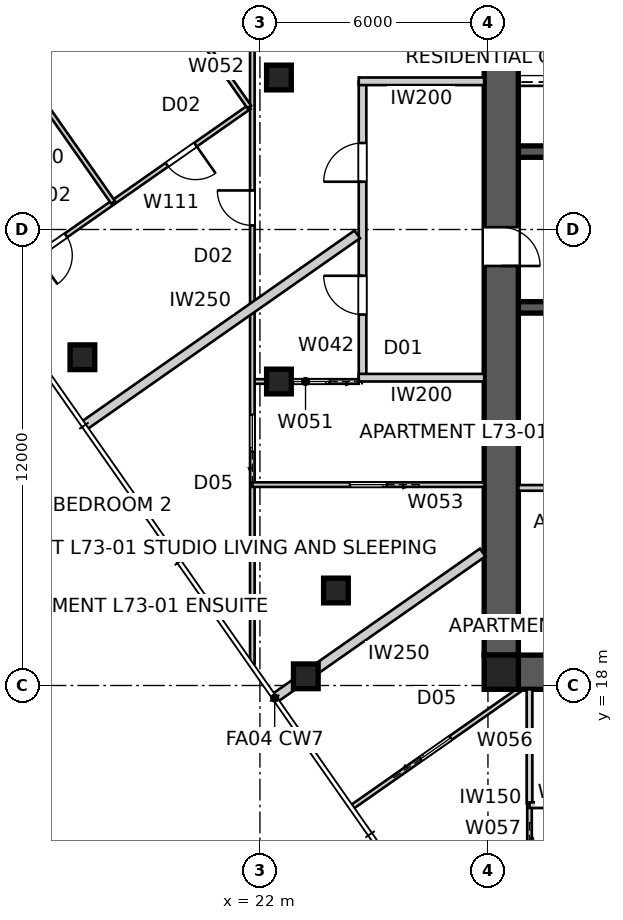
"""IFC4 building model, lengths in metres.
Left out: names, types, materials, properties, quantities, classifications, styles, units other than length and angle.
Written with IfcOpenShell. Run it as: python <this file> out.ifc"""

import sys

from ifc_helpers import new_model, si_unit, direction, frame, frame_2d, origin, origin_2d, place, context, subcontext, project, spatial, polyline, rectangle, outline, extrude, element, fill, save


model = new_model("IFC4")
c1 = context("Model", 3, precision=1e-05, world=origin(), true_north=direction((0.0, 1.0)))
c2 = subcontext(c1, "Body", "Model", "MODEL_VIEW")
j1 = project(units=[si_unit("LENGTHUNIT", "METRE"), si_unit("PLANEANGLEUNIT", "RADIAN")], contexts=[c1])
p1 = place(None, origin())
s1 = spatial("IfcSite", under=j1, at=p1, CompositionType="ELEMENT")
p2 = place(p1, origin())
s2 = spatial("IfcBuilding", under=s1, at=p2, CompositionType="ELEMENT")
p3 = place(p2, frame((0.0, 0.0, 264.2)))
s3 = spatial("IfcBuildingStorey", under=s2, at=p3, CompositionType="ELEMENT", Elevation=264.2)
p4 = place(p3, frame((51.2, 18.35, 0.0), z_axis=(0.0, 0.0, 1.0), x_axis=(-1.0, 0.0, 0.0)))
e1 = element("IfcWall", 1, at=p4, inside=s3, PredefinedType="SHEAR", context=c2, shape_type="SweptSolid", body=[
    extrude(outline(polyline([(0.0, -0.45), (22.4, -0.45), (22.4, -0.025), (22.85, -0.025), (22.85, 0.025), (22.4, 0.025), (22.4, 0.45), (0.0, 0.45), (0.0, 0.025), (-0.45, 0.025), (-0.45, -0.025), (0.0, -0.025), (0.0, -0.45)])), origin(), (0.0, 0.0, 1.0), 3.4),
])
p5 = place(p3, frame((28.35, 41.2, 0.0), z_axis=(0.0, 0.0, 1.0), x_axis=(0.0, -1.0, 0.0)))
e2 = element("IfcWall", 2, at=p5, inside=s3, PredefinedType="SHEAR", context=c2, shape_type="SweptSolid", body=[
    extrude(outline(polyline([(0.0, -0.45), (22.4, -0.45), (22.4, -0.025), (22.85, -0.025), (22.85, 0.025), (22.4, 0.025), (22.4, 0.45), (0.0, 0.45), (0.0, 0.025), (-0.45, 0.025), (-0.45, -0.025), (0.0, -0.025), (0.0, -0.45)])), origin(), (0.0, 0.0, 1.0), 3.4),
])
p6 = place(p5, frame((11.14, 0.0, 0.0)))
e3 = element("IfcOpeningElement", 3, at=p6, cuts=e2, PredefinedType="OPENING", context=c2, shape_type="SweptSolid", body=[
    extrude(rectangle(XDim=1.02, YDim=2.4, at=frame_2d((0.51, 1.2))), frame((0.0, 0.46, 0.0), z_axis=(0.0, -1.0, 0.0), x_axis=(1.0, 0.0, 0.0)), (0.0, 0.0, 1.0), 0.92),
])
p7 = place(p3, frame((28.8, 32.05, 0.0), z_axis=(0.0, 0.0, 1.0), x_axis=(1.0, 0.0, 0.0)))
e4 = element("IfcWall", 4, at=p7, inside=s3, PredefinedType="SHEAR", context=c2, shape_type="SweptSolid", body=[
    extrude(rectangle(XDim=22.4, YDim=0.3, at=frame_2d((11.2, 0.0))), origin(), (0.0, 0.0, 1.0), 3.4),
])
p8 = place(p7, frame((19.04, 0.0, 0.0)))
e5 = element("IfcOpeningElement", 5, at=p8, cuts=e4, PredefinedType="OPENING", context=c2, shape_type="SweptSolid", body=[
    extrude(rectangle(XDim=0.92, YDim=2.1, at=frame_2d((0.46, 1.05))), frame((0.0, 0.16, 0.0), z_axis=(0.0, -1.0, 0.0), x_axis=(1.0, 0.0, 0.0)), (0.0, 0.0, 1.0), 0.32),
])
p9 = place(p7, frame((1.265, 0.0, 0.0)))
e6 = element("IfcOpeningElement", 6, at=p9, cuts=e4, PredefinedType="OPENING", context=c2, shape_type="SweptSolid", body=[
    extrude(rectangle(XDim=1.02, YDim=2.1, at=frame_2d((0.51, 1.05))), frame((0.0, 0.16, 0.0), z_axis=(0.0, -1.0, 0.0), x_axis=(1.0, 0.0, 0.0)), (0.0, 0.0, 1.0), 0.32),
])
p10 = place(p7, frame((4.015, 0.0, 0.0)))
e7 = element("IfcOpeningElement", 7, at=p10, cuts=e4, PredefinedType="OPENING", context=c2, shape_type="SweptSolid", body=[
    extrude(rectangle(XDim=0.92, YDim=2.1, at=frame_2d((0.46, 1.05))), frame((0.0, 0.16, 0.0), z_axis=(0.0, -1.0, 0.0), x_axis=(1.0, 0.0, 0.0)), (0.0, 0.0, 1.0), 0.32),
])
p11 = place(p7, frame((6.115, 0.0, 0.0)))
e8 = element("IfcOpeningElement", 8, at=p11, cuts=e4, PredefinedType="OPENING", context=c2, shape_type="SweptSolid", body=[
    extrude(rectangle(XDim=0.92, YDim=2.1, at=frame_2d((0.46, 1.05))), frame((0.0, 0.16, 0.0), z_axis=(0.0, -1.0, 0.0), x_axis=(1.0, 0.0, 0.0)), (0.0, 0.0, 1.0), 0.32),
])
p12 = place(p7, frame((9.79, 0.0, 0.0)))
e9 = element("IfcOpeningElement", 9, at=p12, cuts=e4, PredefinedType="OPENING", context=c2, shape_type="SweptSolid", body=[
    extrude(rectangle(XDim=0.92, YDim=2.1, at=frame_2d((0.46, 1.05))), frame((0.0, 0.16, 0.0), z_axis=(0.0, -1.0, 0.0), x_axis=(1.0, 0.0, 0.0)), (0.0, 0.0, 1.0), 0.32),
])
p13 = place(p7, frame((12.05, 0.0, 0.0)))
e10 = element("IfcOpeningElement", 10, at=p13, cuts=e4, PredefinedType="OPENING", context=c2, shape_type="SweptSolid", body=[
    extrude(rectangle(XDim=1.1, YDim=2.1, at=frame_2d((0.55, 1.05))), frame((0.0, 0.16, 0.0), z_axis=(0.0, -1.0, 0.0), x_axis=(1.0, 0.0, 0.0)), (0.0, 0.0, 1.0), 0.32),
])
p14 = place(p7, frame((14.85, 0.0, 0.0)))
e11 = element("IfcOpeningElement", 11, at=p14, cuts=e4, PredefinedType="OPENING", context=c2, shape_type="SweptSolid", body=[
    extrude(rectangle(XDim=1.1, YDim=2.1, at=frame_2d((0.55, 1.05))), frame((0.0, 0.16, 0.0), z_axis=(0.0, -1.0, 0.0), x_axis=(1.0, 0.0, 0.0)), (0.0, 0.0, 1.0), 0.32),
])
p15 = place(p3, frame((51.2, 27.95, 0.0), z_axis=(0.0, 0.0, 1.0), x_axis=(-1.0, 0.0, 0.0)))
e12 = element("IfcWall", 12, at=p15, inside=s3, PredefinedType="SHEAR", context=c2, shape_type="SweptSolid", body=[
    extrude(rectangle(XDim=22.4, YDim=0.3, at=frame_2d((11.2, 0.0))), origin(), (0.0, 0.0, 1.0), 3.4),
])
p16 = place(p15, frame((19.04, 0.0, 0.0)))
e13 = element("IfcOpeningElement", 13, at=p16, cuts=e12, PredefinedType="OPENING", context=c2, shape_type="SweptSolid", body=[
    extrude(rectangle(XDim=0.92, YDim=2.1, at=frame_2d((0.46, 1.05))), frame((0.0, 0.16, 0.0), z_axis=(0.0, -1.0, 0.0), x_axis=(1.0, 0.0, 0.0)), (0.0, 0.0, 1.0), 0.32),
])
p17 = place(p15, frame((1.265, 0.0, 0.0)))
e14 = element("IfcOpeningElement", 14, at=p17, cuts=e12, PredefinedType="OPENING", context=c2, shape_type="SweptSolid", body=[
    extrude(rectangle(XDim=1.02, YDim=2.1, at=frame_2d((0.51, 1.05))), frame((0.0, 0.16, 0.0), z_axis=(0.0, -1.0, 0.0), x_axis=(1.0, 0.0, 0.0)), (0.0, 0.0, 1.0), 0.32),
])
p18 = place(p15, frame((4.015, 0.0, 0.0)))
e15 = element("IfcOpeningElement", 15, at=p18, cuts=e12, PredefinedType="OPENING", context=c2, shape_type="SweptSolid", body=[
    extrude(rectangle(XDim=0.92, YDim=2.1, at=frame_2d((0.46, 1.05))), frame((0.0, 0.16, 0.0), z_axis=(0.0, -1.0, 0.0), x_axis=(1.0, 0.0, 0.0)), (0.0, 0.0, 1.0), 0.32),
])
p19 = place(p15, frame((9.34, 0.0, 0.0)))
e16 = element("IfcOpeningElement", 16, at=p19, cuts=e12, PredefinedType="OPENING", context=c2, shape_type="SweptSolid", body=[
    extrude(rectangle(XDim=0.92, YDim=2.1, at=frame_2d((0.46, 1.05))), frame((0.0, 0.16, 0.0), z_axis=(0.0, -1.0, 0.0), x_axis=(1.0, 0.0, 0.0)), (0.0, 0.0, 1.0), 0.32),
])
p20 = place(p15, frame((7.015, 0.0, 0.0)))
e17 = element("IfcOpeningElement", 17, at=p20, cuts=e12, PredefinedType="OPENING", context=c2, shape_type="SweptSolid", body=[
    extrude(rectangle(XDim=0.92, YDim=2.1, at=frame_2d((0.46, 1.05))), frame((0.0, 0.16, 0.0), z_axis=(0.0, -1.0, 0.0), x_axis=(1.0, 0.0, 0.0)), (0.0, 0.0, 1.0), 0.32),
])
p21 = place(p15, frame((12.05, 0.0, 0.0)))
e18 = element("IfcOpeningElement", 18, at=p21, cuts=e12, PredefinedType="OPENING", context=c2, shape_type="SweptSolid", body=[
    extrude(rectangle(XDim=1.1, YDim=2.1, at=frame_2d((0.55, 1.05))), frame((0.0, 0.16, 0.0), z_axis=(0.0, -1.0, 0.0), x_axis=(1.0, 0.0, 0.0)), (0.0, 0.0, 1.0), 0.32),
])
p22 = place(p15, frame((14.85, 0.0, 0.0)))
e19 = element("IfcOpeningElement", 19, at=p22, cuts=e12, PredefinedType="OPENING", context=c2, shape_type="SweptSolid", body=[
    extrude(rectangle(XDim=1.1, YDim=2.1, at=frame_2d((0.55, 1.05))), frame((0.0, 0.16, 0.0), z_axis=(0.0, -1.0, 0.0), x_axis=(1.0, 0.0, 0.0)), (0.0, 0.0, 1.0), 0.32),
])
p23 = place(p3, frame((28.35, 18.35, 0.0), z_axis=(0.0, 0.0, 1.0), x_axis=(1.0, 0.0, 0.0)))
e20 = element("IfcColumn", 20, at=p23, inside=s3, PredefinedType="COLUMN", context=c2, shape_type="SweptSolid", body=[
    extrude(rectangle(XDim=0.9, YDim=0.9, at=origin_2d()), origin(), (0.0, 0.0, 1.0), 3.4),
])
for number, where, z_axis, x_axis in (
    (21, (17.328, 26.638, 0.0), (0.0, 0.0, 1.0), (1.0, 0.0, 0.0)),
    (22, (23.207, 18.242, 0.0), (0.0, 0.0, 1.0), (1.0, 0.0, 0.0)),
):
    element("IfcColumn", number, at=place(p3, frame(where, z_axis=z_axis, x_axis=x_axis)), inside=s3, PredefinedType="COLUMN", context=c2, shape_type="SweptSolid", body=[
        extrude(rectangle(XDim=0.65, YDim=0.65, at=origin_2d()), origin(), (0.0, 0.0, 1.0), 3.2),
    ])
for number, where, z_axis, x_axis in (
    (23, (22.5, 34.0, 0.0), (0.0, 0.0, 1.0), (1.0, 0.0, 0.0)),
    (24, (22.5, 26.0, 0.0), (0.0, 0.0, 1.0), (1.0, 0.0, 0.0)),
    (25, (24.0, 20.5, 0.0), (0.0, 0.0, 1.0), (1.0, 0.0, 0.0)),
):
    element("IfcColumn", number, at=place(p3, frame(where, z_axis=z_axis, x_axis=x_axis)), inside=s3, PredefinedType="COLUMN", context=c2, shape_type="SweptSolid", body=[
        extrude(rectangle(XDim=0.65, YDim=0.65, at=origin_2d()), origin(), (0.0, 0.0, 1.0), 3.4),
    ])
p24 = place(p3, frame((24.7, 26.1, 0.0), z_axis=(0.0, 0.0, 1.0), x_axis=(0.0, 1.0, 0.0)))
e26 = element("IfcWall", 26, at=p24, inside=s3, PredefinedType="PARTITIONING", context=c2, shape_type="SweptSolid", body=[
    extrude(rectangle(XDim=7.8, YDim=0.2, at=frame_2d((3.9, 0.0))), origin(), (0.0, 0.0, 1.0), 3.2),
])
p25 = place(p24, frame((1.662, 0.0, 0.0)))
e27 = element("IfcOpeningElement", 27, at=p25, cuts=e26, PredefinedType="OPENING", context=c2, shape_type="SweptSolid", body=[
    extrude(rectangle(XDim=1.02, YDim=2.34, at=frame_2d((0.51, 1.17))), frame((0.0, 0.11, 0.0), z_axis=(0.0, -1.0, 0.0), x_axis=(1.0, 0.0, 0.0)), (0.0, 0.0, 1.0), 0.22),
])
p26 = place(p24, frame((5.157, 0.0, 0.0)))
e28 = element("IfcOpeningElement", 28, at=p26, cuts=e26, PredefinedType="OPENING", context=c2, shape_type="SweptSolid", body=[
    extrude(rectangle(XDim=1.02, YDim=2.34, at=frame_2d((0.51, 1.17))), frame((0.0, 0.11, 0.0), z_axis=(0.0, -1.0, 0.0), x_axis=(1.0, 0.0, 0.0)), (0.0, 0.0, 1.0), 0.22),
])
for number, where, z_axis, x_axis in (
    (29, (27.9, 33.9, 0.0), (0.0, 0.0, 1.0), (-1.0, 0.0, 0.0)),
    (30, (27.9, 26.1, 0.0), (0.0, 0.0, 1.0), (-1.0, 0.0, 0.0)),
):
    element("IfcWall", number, at=place(p3, frame(where, z_axis=z_axis, x_axis=x_axis)), inside=s3, PredefinedType="PARTITIONING", context=c2, shape_type="SweptSolid", body=[
        extrude(rectangle(XDim=3.3, YDim=0.2, at=frame_2d((1.65, 0.0))), origin(), (0.0, 0.0, 1.0), 3.2),
    ])
p27 = place(p3, frame((22.388, 17.668, 0.0), z_axis=(0.0, 0.0, 1.0), x_axis=(0.819161528122, 0.573562891796, 0.0)))
e31 = element("IfcWall", 31, at=p27, inside=s3, PredefinedType="PARTITIONING", context=c2, shape_type="SweptSolid", body=[
    extrude(rectangle(XDim=6.681, YDim=0.25, at=frame_2d((3.341, 0.0))), origin(), (0.0, 0.0, 1.0), 3.2),
])
p28 = place(p3, frame((17.369, 24.836, 0.0), z_axis=(0.0, 0.0, 1.0), x_axis=(0.819152220062, 0.573576185321, 0.0)))
e32 = element("IfcWall", 32, at=p28, inside=s3, PredefinedType="PARTITIONING", context=c2, shape_type="SweptSolid", body=[
    extrude(rectangle(XDim=8.779, YDim=0.25, at=frame_2d((4.39, 0.0))), origin(), (0.0, 0.0, 1.0), 3.2),
])
p29 = place(p3, frame((37.0, 23.2, 0.0), z_axis=(0.0, 0.0, 1.0), x_axis=(-1.0, 0.0, 0.0)))
e33 = element("IfcWall", 33, at=p29, inside=s3, PredefinedType="SOLIDWALL", context=c2, shape_type="SweptSolid", body=[
    extrude(rectangle(XDim=8.2, YDim=0.15, at=frame_2d((4.1, 0.0))), origin(), (0.0, 0.0, 1.0), 3.2),
])
p30 = place(p29, frame((3.64, 0.0, 0.0)))
e34 = element("IfcOpeningElement", 34, at=p30, cuts=e33, PredefinedType="OPENING", context=c2, shape_type="SweptSolid", body=[
    extrude(rectangle(XDim=0.92, YDim=2.1, at=frame_2d((0.46, 1.05))), frame((0.0, 0.085, 0.0), z_axis=(0.0, -1.0, 0.0), x_axis=(1.0, 0.0, 0.0)), (0.0, 0.0, 1.0), 0.17),
])
p31 = place(p3, frame((24.6, 26.0, 0.0), z_axis=(0.0, 0.0, 1.0), x_axis=(-1.0, 0.0, 0.0)))
e35 = element("IfcWall", 35, at=p31, inside=s3, PredefinedType="PARTITIONING", context=c2, shape_type="SweptSolid", body=[
    extrude(rectangle(XDim=2.8, YDim=0.12, at=frame_2d((1.4, 0.0))), origin(), (0.0, 0.0, 1.0), 3.2),
])
p32 = place(p31, frame((0.77, 0.0, 0.0)))
e36 = element("IfcOpeningElement", 36, at=p32, cuts=e35, PredefinedType="OPENING", context=c2, shape_type="SweptSolid", body=[
    extrude(rectangle(XDim=0.96, YDim=2.1, at=frame_2d((0.48, 1.05))), frame((0.0, 0.07, 0.0), z_axis=(0.0, -1.0, 0.0), x_axis=(1.0, 0.0, 0.0)), (0.0, 0.0, 1.0), 0.14),
])
p33 = place(p3, frame((21.8, 18.578, 0.0), z_axis=(0.0, 0.0, 1.0), x_axis=(0.0, 1.0, 0.0)))
e37 = element("IfcWall", 37, at=p33, inside=s3, PredefinedType="PARTITIONING", context=c2, shape_type="SweptSolid", body=[
    extrude(rectangle(XDim=21.75, YDim=0.12, at=frame_2d((10.875, 0.0))), origin(), (0.0, 0.0, 1.0), 3.2),
])
p34 = place(p33, frame((11.53, 0.0, 0.0)))
e38 = element("IfcOpeningElement", 38, at=p34, cuts=e37, PredefinedType="OPENING", context=c2, shape_type="SweptSolid", body=[
    extrude(rectangle(XDim=0.92, YDim=2.34, at=frame_2d((0.46, 1.17))), frame((0.0, 0.07, 0.0), z_axis=(0.0, -1.0, 0.0), x_axis=(1.0, 0.0, 0.0)), (0.0, 0.0, 1.0), 0.14),
])
p35 = place(p33, frame((5.585, 0.0, 0.0)))
e39 = element("IfcOpeningElement", 39, at=p35, cuts=e37, PredefinedType="OPENING", context=c2, shape_type="SweptSolid", body=[
    extrude(rectangle(XDim=0.96, YDim=2.1, at=frame_2d((0.48, 1.05))), frame((0.0, 0.07, 0.0), z_axis=(0.0, -1.0, 0.0), x_axis=(1.0, 0.0, 0.0)), (0.0, 0.0, 1.0), 0.14),
])
p36 = place(p33, frame((18.936, 0.0, 0.0)))
e40 = element("IfcOpeningElement", 40, at=p36, cuts=e37, PredefinedType="OPENING", context=c2, shape_type="SweptSolid", body=[
    extrude(rectangle(XDim=0.92, YDim=2.34, at=frame_2d((0.46, 1.17))), frame((0.0, 0.07, 0.0), z_axis=(0.0, -1.0, 0.0), x_axis=(1.0, 0.0, 0.0)), (0.0, 0.0, 1.0), 0.14),
])
p37 = place(p3, frame((27.9, 23.286, 0.0), z_axis=(0.0, 0.0, 1.0), x_axis=(-1.0, 0.0, 0.0)))
e41 = element("IfcWall", 41, at=p37, inside=s3, PredefinedType="PARTITIONING", context=c2, shape_type="SweptSolid", body=[
    extrude(rectangle(XDim=6.1, YDim=0.12, at=frame_2d((3.05, 0.0))), origin(), (0.0, 0.0, 1.0), 3.2),
])
p38 = place(p37, frame((2.57, 0.0, 0.0)))
e42 = element("IfcOpeningElement", 42, at=p38, cuts=e41, PredefinedType="OPENING", context=c2, shape_type="SweptSolid", body=[
    extrude(rectangle(XDim=0.96, YDim=2.1, at=frame_2d((0.48, 1.05))), frame((0.0, 0.07, 0.0), z_axis=(0.0, -1.0, 0.0), x_axis=(1.0, 0.0, 0.0)), (0.0, 0.0, 1.0), 0.14),
])
p39 = place(p3, frame((24.437, 14.812, 0.0), z_axis=(0.0, 0.0, 1.0), x_axis=(0.819157353031, 0.573568854608, 0.0)))
e43 = element("IfcWall", 43, at=p39, inside=s3, PredefinedType="PARTITIONING", context=c2, shape_type="SweptSolid", body=[
    extrude(rectangle(XDim=5.384, YDim=0.12, at=frame_2d((2.692, 0.0))), origin(), (0.0, 0.0, 1.0), 3.2),
])
p40 = place(p39, frame((2.192, 0.0, 0.0)))
e44 = element("IfcOpeningElement", 44, at=p40, cuts=e43, PredefinedType="OPENING", context=c2, shape_type="SweptSolid", body=[
    extrude(rectangle(XDim=0.96, YDim=2.1, at=frame_2d((0.48, 1.05))), frame((0.0, 0.07, 0.0), z_axis=(0.0, -1.0, 0.0), x_axis=(1.0, 0.0, 0.0)), (0.0, 0.0, 1.0), 0.14),
])
p41 = place(p3, frame((29.094, 14.9, 0.0), z_axis=(0.0, 0.0, 1.0), x_axis=(0.0, -1.0, 0.0)))
e45 = element("IfcWall", 45, at=p41, inside=s3, PredefinedType="PARTITIONING", context=c2, shape_type="SweptSolid", body=[
    extrude(rectangle(XDim=3.1, YDim=0.12, at=frame_2d((1.55, 0.0))), origin(), (0.0, 0.0, 1.0), 3.2),
])
p42 = place(p41, frame((1.37, 0.0, 0.0)))
e46 = element("IfcOpeningElement", 46, at=p42, cuts=e45, PredefinedType="OPENING", context=c2, shape_type="SweptSolid", body=[
    extrude(rectangle(XDim=0.96, YDim=2.1, at=frame_2d((0.48, 1.05))), frame((0.0, 0.07, 0.0), z_axis=(0.0, -1.0, 0.0), x_axis=(1.0, 0.0, 0.0)), (0.0, 0.0, 1.0), 0.14),
])
p43 = place(p3, frame((29.094, 17.9, 0.0), z_axis=(0.0, 0.0, 1.0), x_axis=(0.0, -1.0, 0.0)))
e47 = element("IfcWall", 47, at=p43, inside=s3, PredefinedType="SOLIDWALL", context=c2, shape_type="SweptSolid", body=[
    extrude(rectangle(XDim=3.0, YDim=0.15, at=frame_2d((1.5, 0.0))), origin(), (0.0, 0.0, 1.0), 3.2),
])
p44 = place(p3, frame((29.094, 14.85, 0.0), z_axis=(0.0, 0.0, 1.0), x_axis=(1.0, 0.0, 0.0)))
e48 = element("IfcWall", 48, at=p44, inside=s3, PredefinedType="SOLIDWALL", context=c2, shape_type="SweptSolid", body=[
    extrude(rectangle(XDim=1.909, YDim=0.15, at=frame_2d((0.954, 0.0))), origin(), (0.0, 0.0, 1.0), 3.2),
])
p45 = place(p3, frame((21.72, 33.223, 0.0), z_axis=(0.0, 0.0, 1.0), x_axis=(-0.819152099525, -0.573576357466, 0.0)))
e49 = element("IfcWall", 49, at=p45, inside=s3, PredefinedType="PARTITIONING", context=c2, shape_type="SweptSolid", body=[
    extrude(rectangle(XDim=8.335, YDim=0.12, at=frame_2d((4.167, 0.0))), origin(), (0.0, 0.0, 1.0), 3.2),
])
p46 = place(p45, frame((1.728, 0.0, 0.0)))
e50 = element("IfcOpeningElement", 50, at=p46, cuts=e49, PredefinedType="OPENING", context=c2, shape_type="SweptSolid", body=[
    extrude(rectangle(XDim=0.92, YDim=2.34, at=frame_2d((0.46, 1.17))), frame((0.0, 0.07, 0.0), z_axis=(0.0, -1.0, 0.0), x_axis=(1.0, 0.0, 0.0)), (0.0, 0.0, 1.0), 0.14),
])
p47 = place(p45, frame((5.89, 0.0, 0.0)))
e51 = element("IfcOpeningElement", 51, at=p47, cuts=e49, PredefinedType="OPENING", context=c2, shape_type="SweptSolid", body=[
    extrude(rectangle(XDim=0.92, YDim=2.34, at=frame_2d((0.46, 1.17))), frame((0.0, 0.07, 0.0), z_axis=(0.0, -1.0, 0.0), x_axis=(1.0, 0.0, 0.0)), (0.0, 0.0, 1.0), 0.14),
])
p48 = place(p3, frame((16.94, 40.051, 0.0), z_axis=(0.0, 0.0, 1.0), x_axis=(0.573576357466, -0.819152099525, 0.0)))
e52 = element("IfcWall", 52, at=p48, inside=s3, PredefinedType="PARTITIONING", context=c2, shape_type="SweptSolid", body=[
    extrude(rectangle(XDim=8.335, YDim=0.12, at=frame_2d((4.167, 0.0))), origin(), (0.0, 0.0, 1.0), 3.2),
])
p49 = place(p3, frame((18.137, 30.714, 0.0), z_axis=(0.0, 0.0, 1.0), x_axis=(-0.573594626521, 0.819139307094, 0.0)))
e53 = element("IfcWall", 53, at=p49, inside=s3, PredefinedType="PARTITIONING", context=c2, shape_type="SweptSolid", body=[
    extrude(rectangle(XDim=4.335, YDim=0.12, at=frame_2d((2.167, 0.0))), origin(), (0.0, 0.0, 1.0), 3.2),
])
p50 = place(p25, origin())
e54 = element("IfcDoor", 54, at=p50, inside=s3, OperationType="SINGLE_SWING_RIGHT", PredefinedType="DOOR", context=c2, shape_type="SweptSolid", body=[
    extrude(rectangle(XDim=1.02, YDim=2.34, at=frame_2d((0.51, 1.17))), frame((0.0, 0.025, 0.0), z_axis=(0.0, -1.0, 0.0), x_axis=(1.0, 0.0, 0.0)), (0.0, 0.0, 1.0), 0.05),
])
fill(e27, e54)
p51 = place(p26, origin())
e55 = element("IfcDoor", 55, at=p51, inside=s3, OperationType="SINGLE_SWING_LEFT", PredefinedType="DOOR", context=c2, shape_type="SweptSolid", body=[
    extrude(rectangle(XDim=1.02, YDim=2.34, at=frame_2d((0.51, 1.17))), frame((0.0, 0.025, 0.0), z_axis=(0.0, -1.0, 0.0), x_axis=(1.0, 0.0, 0.0)), (0.0, 0.0, 1.0), 0.05),
])
fill(e28, e55)
p52 = place(p32, origin())
e56 = element("IfcDoor", 56, at=p52, inside=s3, OperationType="SLIDING_TO_LEFT", PredefinedType="DOOR", context=c2, shape_type="SweptSolid", body=[
    extrude(rectangle(XDim=0.96, YDim=2.1, at=frame_2d((0.48, 1.05))), frame((0.0, 0.025, 0.0), z_axis=(0.0, -1.0, 0.0), x_axis=(1.0, 0.0, 0.0)), (0.0, 0.0, 1.0), 0.05),
])
fill(e36, e56)
p53 = place(p34, origin())
e57 = element("IfcDoor", 57, at=p53, inside=s3, OperationType="SINGLE_SWING_RIGHT", PredefinedType="DOOR", context=c2, shape_type="SweptSolid", body=[
    extrude(rectangle(XDim=0.92, YDim=2.34, at=frame_2d((0.46, 1.17))), frame((0.0, 0.025, 0.0), z_axis=(0.0, -1.0, 0.0), x_axis=(1.0, 0.0, 0.0)), (0.0, 0.0, 1.0), 0.05),
])
fill(e38, e57)
p54 = place(p38, origin())
e58 = element("IfcDoor", 58, at=p54, inside=s3, OperationType="SLIDING_TO_LEFT", PredefinedType="DOOR", context=c2, shape_type="SweptSolid", body=[
    extrude(rectangle(XDim=0.96, YDim=2.1, at=frame_2d((0.48, 1.05))), frame((0.0, 0.025, 0.0), z_axis=(0.0, -1.0, 0.0), x_axis=(1.0, 0.0, 0.0)), (0.0, 0.0, 1.0), 0.05),
])
fill(e42, e58)
p55 = place(p35, origin())
e59 = element("IfcDoor", 59, at=p55, inside=s3, OperationType="SLIDING_TO_LEFT", PredefinedType="DOOR", context=c2, shape_type="SweptSolid", body=[
    extrude(rectangle(XDim=0.96, YDim=2.1, at=frame_2d((0.48, 1.05))), frame((0.0, 0.025, 0.0), z_axis=(0.0, -1.0, 0.0), x_axis=(1.0, 0.0, 0.0)), (0.0, 0.0, 1.0), 0.05),
])
fill(e39, e59)
p56 = place(p40, origin())
e60 = element("IfcDoor", 60, at=p56, inside=s3, OperationType="SLIDING_TO_LEFT", PredefinedType="DOOR", context=c2, shape_type="SweptSolid", body=[
    extrude(rectangle(XDim=0.96, YDim=2.1, at=frame_2d((0.48, 1.05))), frame((0.0, 0.025, 0.0), z_axis=(0.0, -1.0, 0.0), x_axis=(1.0, 0.0, 0.0)), (0.0, 0.0, 1.0), 0.05),
])
fill(e44, e60)
p57 = place(p46, origin())
e61 = element("IfcDoor", 61, at=p57, inside=s3, OperationType="SINGLE_SWING_LEFT", PredefinedType="DOOR", context=c2, shape_type="SweptSolid", body=[
    extrude(rectangle(XDim=0.92, YDim=2.34, at=frame_2d((0.46, 1.17))), frame((0.0, 0.025, 0.0), z_axis=(0.0, -1.0, 0.0), x_axis=(1.0, 0.0, 0.0)), (0.0, 0.0, 1.0), 0.05),
])
fill(e50, e61)
p58 = place(p47, origin())
e62 = element("IfcDoor", 62, at=p58, inside=s3, OperationType="SINGLE_SWING_RIGHT", PredefinedType="DOOR", context=c2, shape_type="SweptSolid", body=[
    extrude(rectangle(XDim=0.92, YDim=2.34, at=frame_2d((0.46, 1.17))), frame((0.0, 0.025, 0.0), z_axis=(0.0, -1.0, 0.0), x_axis=(1.0, 0.0, 0.0)), (0.0, 0.0, 1.0), 0.05),
])
fill(e51, e62)
p59 = place(p6, origin())
e63 = element("IfcDoor", 63, at=p59, inside=s3, OperationType="SINGLE_SWING_RIGHT", PredefinedType="DOOR", context=c2, shape_type="SweptSolid", body=[
    extrude(rectangle(XDim=1.02, YDim=2.4, at=frame_2d((0.51, 1.2))), frame((0.0, 0.025, 0.0), z_axis=(0.0, -1.0, 0.0), x_axis=(1.0, 0.0, 0.0)), (0.0, 0.0, 1.0), 0.05),
])
fill(e3, e63)
save(model, sys.argv[1])
